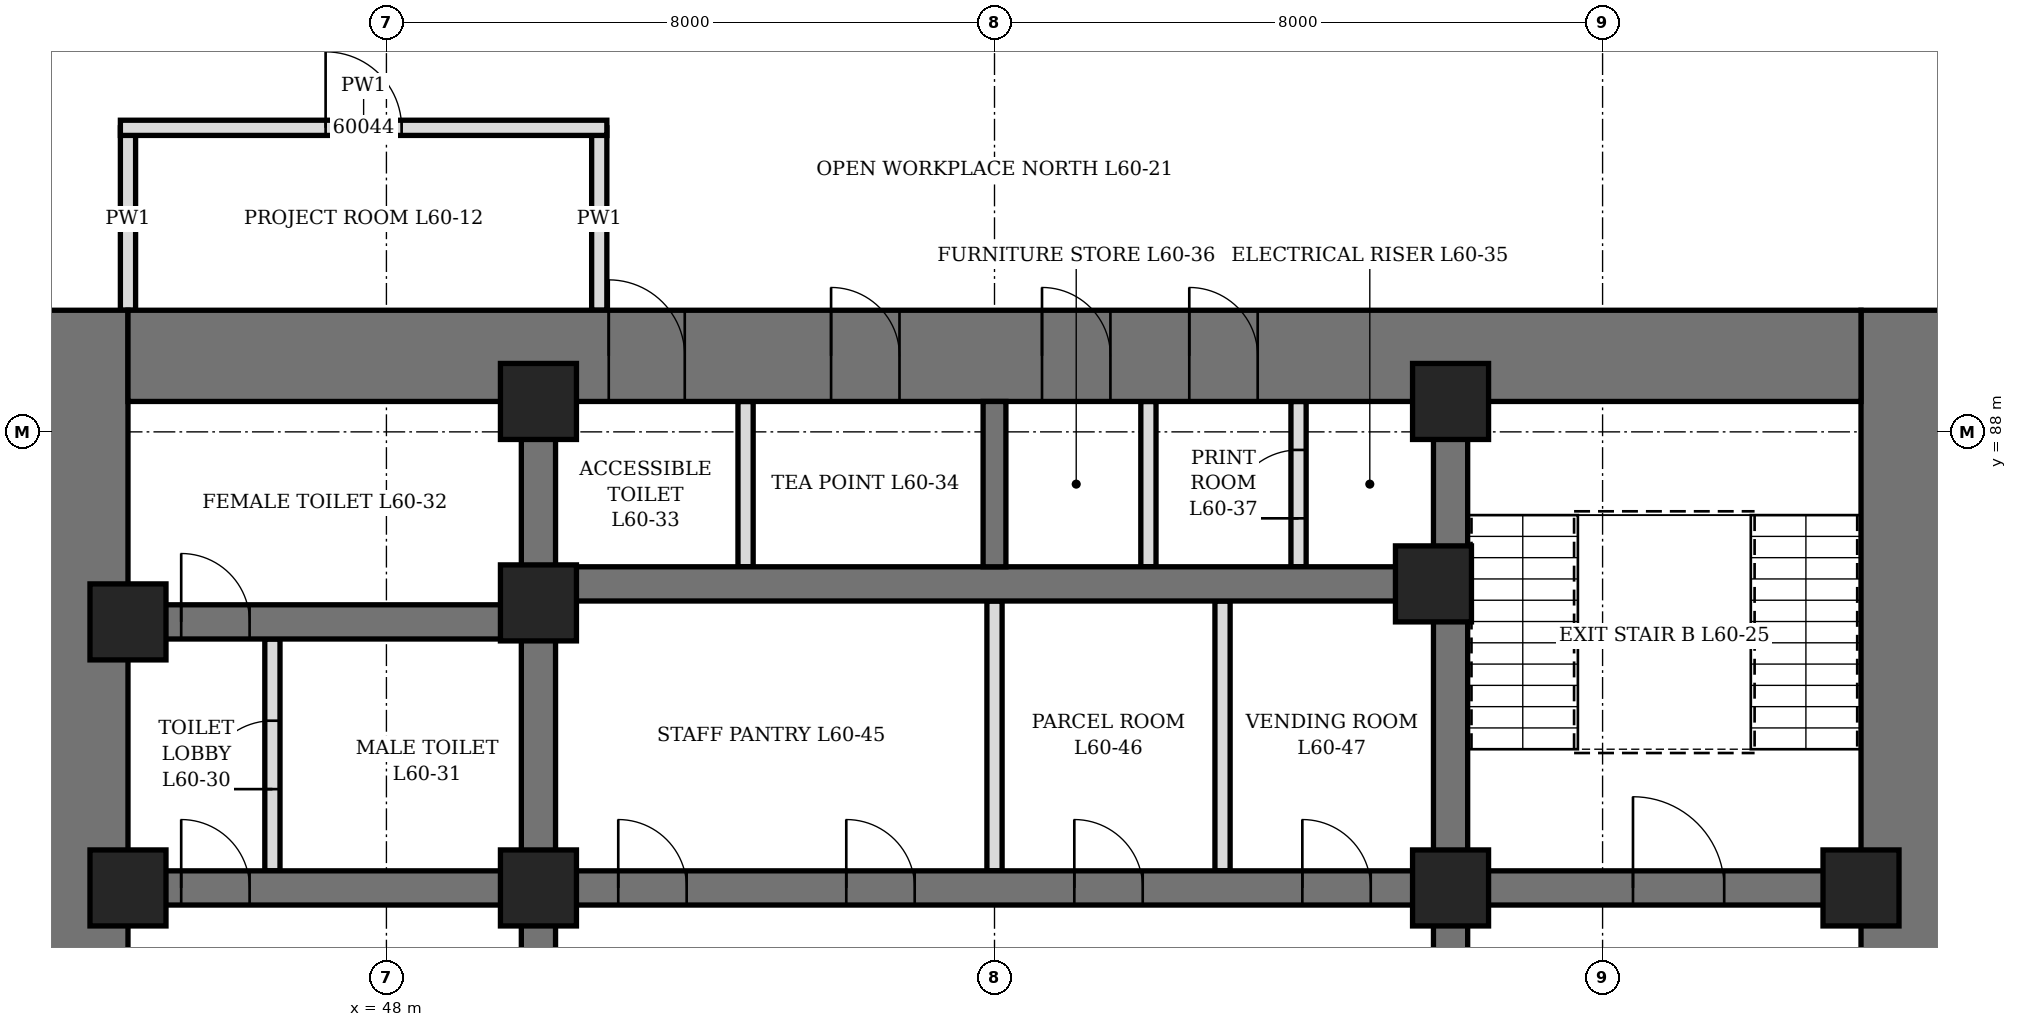
"""IFC4 building model, lengths in metres.
Left out: names, types, materials, properties, quantities, classifications, styles, units other than length and angle.
Written with IfcOpenShell. Run it as: python <this file> out.ifc"""

import sys

from ifc_helpers import new_model, si_unit, direction, frame, frame_2d, origin, origin_2d, place, context, subcontext, project, spatial, rectangle, hollow_rectangle, extrude, element, fill, save


model = new_model("IFC4")
c1 = context("Model", 3, precision=1e-05, world=origin(), true_north=direction((0.0, 1.0)))
c2 = subcontext(c1, "Body", "Model", "MODEL_VIEW")
j1 = project(units=[si_unit("LENGTHUNIT", "METRE"), si_unit("PLANEANGLEUNIT", "RADIAN")], contexts=[c1])
p1 = place(None, origin())
s1 = spatial("IfcSite", under=j1, at=p1, CompositionType="ELEMENT")
p2 = place(p1, origin())
s2 = spatial("IfcBuilding", under=s1, at=p2, CompositionType="ELEMENT")
p3 = place(p2, frame((0.0, 0.0, 267.1)))
s3 = spatial("IfcBuildingStorey", under=s2, at=p3, CompositionType="ELEMENT", Elevation=267.1)
p4 = place(p3, frame((44.0, 70.4, 0.0), z_axis=(0.0, 0.0, 1.0), x_axis=(0.0, 1.0, 0.0)))
e1 = element("IfcWall", 1, at=p4, inside=s3, PredefinedType="SHEAR", context=c2, shape_type="SweptSolid", body=[
    extrude(rectangle(XDim=19.2, YDim=1.2, at=frame_2d((9.6, 0.0))), origin(), (0.0, 0.0, 1.0), 4.2),
])
p5 = place(p4, frame((8.6, 0.0, 0.0)))
e2 = element("IfcOpeningElement", 2, at=p5, cuts=e1, PredefinedType="OPENING", context=c2, shape_type="SweptSolid", body=[
    extrude(rectangle(XDim=2.0, YDim=2.4, at=frame_2d((1.0, 1.2))), frame((0.0, 0.61, 0.0), z_axis=(0.0, -1.0, 0.0), x_axis=(1.0, 0.0, 0.0)), (0.0, 0.0, 1.0), 1.22),
])
p6 = place(p3, frame((68.0, 70.4, 0.0), z_axis=(0.0, 0.0, 1.0), x_axis=(0.0, 1.0, 0.0)))
e3 = element("IfcWall", 3, at=p6, inside=s3, PredefinedType="SHEAR", context=c2, shape_type="SweptSolid", body=[
    extrude(rectangle(XDim=19.2, YDim=1.2, at=frame_2d((9.6, 0.0))), origin(), (0.0, 0.0, 1.0), 4.2),
])
p7 = place(p6, frame((8.6, 0.0, 0.0)))
e4 = element("IfcOpeningElement", 4, at=p7, cuts=e3, PredefinedType="OPENING", context=c2, shape_type="SweptSolid", body=[
    extrude(rectangle(XDim=2.0, YDim=2.4, at=frame_2d((1.0, 1.2))), frame((0.0, 0.61, 0.0), z_axis=(0.0, -1.0, 0.0), x_axis=(1.0, 0.0, 0.0)), (0.0, 0.0, 1.0), 1.22),
])
p8 = place(p3, frame((44.6, 89.0, 0.0), z_axis=(0.0, 0.0, 1.0), x_axis=(1.0, 0.0, 0.0)))
e5 = element("IfcWall", 5, at=p8, inside=s3, PredefinedType="SHEAR", context=c2, shape_type="SweptSolid", body=[
    extrude(rectangle(XDim=22.8, YDim=1.2, at=frame_2d((11.4, 0.0))), origin(), (0.0, 0.0, 1.0), 4.2),
])
p9 = place(p8, frame((6.325, 0.0, 0.0)))
e6 = element("IfcOpeningElement", 6, at=p9, cuts=e5, PredefinedType="OPENING", context=c2, shape_type="SweptSolid", body=[
    extrude(rectangle(XDim=1.0, YDim=2.1, at=frame_2d((0.5, 1.05))), frame((0.0, 0.61, 0.0), z_axis=(0.0, -1.0, 0.0), x_axis=(1.0, 0.0, 0.0)), (0.0, 0.0, 1.0), 1.22),
])
p10 = place(p8, frame((9.25, 0.0, 0.0)))
e7 = element("IfcOpeningElement", 7, at=p10, cuts=e5, PredefinedType="OPENING", context=c2, shape_type="SweptSolid", body=[
    extrude(rectangle(XDim=0.9, YDim=2.1, at=frame_2d((0.45, 1.05))), frame((0.0, 0.61, 0.0), z_axis=(0.0, -1.0, 0.0), x_axis=(1.0, 0.0, 0.0)), (0.0, 0.0, 1.0), 1.22),
])
p11 = place(p8, frame((12.025, 0.0, 0.0)))
e8 = element("IfcOpeningElement", 8, at=p11, cuts=e5, PredefinedType="OPENING", context=c2, shape_type="SweptSolid", body=[
    extrude(rectangle(XDim=0.9, YDim=2.1, at=frame_2d((0.45, 1.05))), frame((0.0, 0.61, 0.0), z_axis=(0.0, -1.0, 0.0), x_axis=(1.0, 0.0, 0.0)), (0.0, 0.0, 1.0), 1.22),
])
p12 = place(p8, frame((13.962, 0.0, 0.0)))
e9 = element("IfcOpeningElement", 9, at=p12, cuts=e5, PredefinedType="OPENING", context=c2, shape_type="SweptSolid", body=[
    extrude(rectangle(XDim=0.9, YDim=2.1, at=frame_2d((0.45, 1.05))), frame((0.0, 0.61, 0.0), z_axis=(0.0, -1.0, 0.0), x_axis=(1.0, 0.0, 0.0)), (0.0, 0.0, 1.0), 1.22),
])
p13 = place(p3, frame((50.0, 71.6, 0.0), z_axis=(0.0, 0.0, 1.0), x_axis=(0.0, 1.0, 0.0)))
e10 = element("IfcWall", 10, at=p13, inside=s3, PredefinedType="SHEAR", context=c2, shape_type="SweptSolid", body=[
    extrude(rectangle(XDim=16.8, YDim=0.45, at=frame_2d((8.4, 0.0))), origin(), (0.0, 0.0, 1.0), 4.2),
])
p14 = place(p13, frame((7.5, 0.0, 0.0)))
e11 = element("IfcOpeningElement", 11, at=p14, cuts=e10, PredefinedType="OPENING", context=c2, shape_type="SweptSolid", body=[
    extrude(rectangle(XDim=1.8, YDim=2.4, at=frame_2d((0.9, 1.2))), frame((0.0, 0.235, 0.0), z_axis=(0.0, -1.0, 0.0), x_axis=(1.0, 0.0, 0.0)), (0.0, 0.0, 1.0), 0.47),
])
p15 = place(p3, frame((62.0, 71.6, 0.0), z_axis=(0.0, 0.0, 1.0), x_axis=(0.0, 1.0, 0.0)))
e12 = element("IfcWall", 12, at=p15, inside=s3, PredefinedType="SHEAR", context=c2, shape_type="SweptSolid", body=[
    extrude(rectangle(XDim=16.8, YDim=0.45, at=frame_2d((8.4, 0.0))), origin(), (0.0, 0.0, 1.0), 4.2),
])
p16 = place(p15, frame((7.5, 0.0, 0.0)))
e13 = element("IfcOpeningElement", 13, at=p16, cuts=e12, PredefinedType="OPENING", context=c2, shape_type="SweptSolid", body=[
    extrude(rectangle(XDim=1.8, YDim=2.4, at=frame_2d((0.9, 1.2))), frame((0.0, 0.235, 0.0), z_axis=(0.0, -1.0, 0.0), x_axis=(1.0, 0.0, 0.0)), (0.0, 0.0, 1.0), 0.47),
])
p17 = place(p3, frame((44.6, 82.0, 0.0), z_axis=(0.0, 0.0, 1.0), x_axis=(1.0, 0.0, 0.0)))
e14 = element("IfcWall", 14, at=p17, inside=s3, PredefinedType="SHEAR", context=c2, shape_type="SweptSolid", body=[
    extrude(rectangle(XDim=5.175, YDim=0.45, at=frame_2d((2.587, 0.0))), origin(), (0.0, 0.0, 1.0), 4.2),
])
p18 = place(p17, frame((0.7, 0.0, 0.0)))
e15 = element("IfcOpeningElement", 15, at=p18, cuts=e14, PredefinedType="OPENING", context=c2, shape_type="SweptSolid", body=[
    extrude(rectangle(XDim=0.9, YDim=2.1, at=frame_2d((0.45, 1.05))), frame((0.0, 0.235, 0.0), z_axis=(0.0, -1.0, 0.0), x_axis=(1.0, 0.0, 0.0)), (0.0, 0.0, 1.0), 0.47),
])
p19 = place(p3, frame((44.6, 85.5, 0.0), z_axis=(0.0, 0.0, 1.0), x_axis=(1.0, 0.0, 0.0)))
e16 = element("IfcWall", 16, at=p19, inside=s3, PredefinedType="SHEAR", context=c2, shape_type="SweptSolid", body=[
    extrude(rectangle(XDim=5.175, YDim=0.45, at=frame_2d((2.587, 0.0))), origin(), (0.0, 0.0, 1.0), 4.2),
])
p20 = place(p19, frame((0.7, 0.0, 0.0)))
e17 = element("IfcOpeningElement", 17, at=p20, cuts=e16, PredefinedType="OPENING", context=c2, shape_type="SweptSolid", body=[
    extrude(rectangle(XDim=0.9, YDim=2.1, at=frame_2d((0.45, 1.05))), frame((0.0, 0.235, 0.0), z_axis=(0.0, -1.0, 0.0), x_axis=(1.0, 0.0, 0.0)), (0.0, 0.0, 1.0), 0.47),
])
p21 = place(p3, frame((62.225, 82.0, 0.0), z_axis=(0.0, 0.0, 1.0), x_axis=(1.0, 0.0, 0.0)))
e18 = element("IfcWall", 18, at=p21, inside=s3, PredefinedType="SHEAR", context=c2, shape_type="SweptSolid", body=[
    extrude(rectangle(XDim=5.175, YDim=0.45, at=frame_2d((2.587, 0.0))), origin(), (0.0, 0.0, 1.0), 4.2),
])
p22 = place(p21, frame((2.175, 0.0, 0.0)))
e19 = element("IfcOpeningElement", 19, at=p22, cuts=e18, PredefinedType="OPENING", context=c2, shape_type="SweptSolid", body=[
    extrude(rectangle(XDim=1.2, YDim=2.1, at=frame_2d((0.6, 1.05))), frame((0.0, 0.235, 0.0), z_axis=(0.0, -1.0, 0.0), x_axis=(1.0, 0.0, 0.0)), (0.0, 0.0, 1.0), 0.47),
])
p23 = place(p3, frame((50.225, 82.0, 0.0), z_axis=(0.0, 0.0, 1.0), x_axis=(1.0, 0.0, 0.0)))
e20 = element("IfcWall", 20, at=p23, inside=s3, PredefinedType="SHEAR", context=c2, shape_type="SweptSolid", body=[
    extrude(rectangle(XDim=11.55, YDim=0.45, at=frame_2d((5.775, 0.0))), origin(), (0.0, 0.0, 1.0), 4.2),
])
p24 = place(p23, frame((0.825, 0.0, 0.0)))
e21 = element("IfcOpeningElement", 21, at=p24, cuts=e20, PredefinedType="OPENING", context=c2, shape_type="SweptSolid", body=[
    extrude(rectangle(XDim=0.9, YDim=2.1, at=frame_2d((0.45, 1.05))), frame((0.0, 0.235, 0.0), z_axis=(0.0, -1.0, 0.0), x_axis=(1.0, 0.0, 0.0)), (0.0, 0.0, 1.0), 0.47),
])
p25 = place(p23, frame((3.825, 0.0, 0.0)))
e22 = element("IfcOpeningElement", 22, at=p25, cuts=e20, PredefinedType="OPENING", context=c2, shape_type="SweptSolid", body=[
    extrude(rectangle(XDim=0.9, YDim=2.1, at=frame_2d((0.45, 1.05))), frame((0.0, 0.235, 0.0), z_axis=(0.0, -1.0, 0.0), x_axis=(1.0, 0.0, 0.0)), (0.0, 0.0, 1.0), 0.47),
])
p26 = place(p23, frame((6.825, 0.0, 0.0)))
e23 = element("IfcOpeningElement", 23, at=p26, cuts=e20, PredefinedType="OPENING", context=c2, shape_type="SweptSolid", body=[
    extrude(rectangle(XDim=0.9, YDim=2.1, at=frame_2d((0.45, 1.05))), frame((0.0, 0.235, 0.0), z_axis=(0.0, -1.0, 0.0), x_axis=(1.0, 0.0, 0.0)), (0.0, 0.0, 1.0), 0.47),
])
p27 = place(p23, frame((9.825, 0.0, 0.0)))
e24 = element("IfcOpeningElement", 24, at=p27, cuts=e20, PredefinedType="OPENING", context=c2, shape_type="SweptSolid", body=[
    extrude(rectangle(XDim=0.9, YDim=2.1, at=frame_2d((0.45, 1.05))), frame((0.0, 0.235, 0.0), z_axis=(0.0, -1.0, 0.0), x_axis=(1.0, 0.0, 0.0)), (0.0, 0.0, 1.0), 0.47),
])
p28 = place(p3, frame((50.225, 86.0, 0.0), z_axis=(0.0, 0.0, 1.0), x_axis=(1.0, 0.0, 0.0)))
e25 = element("IfcWall", 25, at=p28, inside=s3, PredefinedType="SHEAR", context=c2, shape_type="SweptSolid", body=[
    extrude(rectangle(XDim=11.55, YDim=0.45, at=frame_2d((5.775, 0.0))), origin(), (0.0, 0.0, 1.0), 4.2),
])
p29 = place(p3, frame((56.0, 86.225, 0.0), z_axis=(0.0, 0.0, 1.0), x_axis=(0.0, 1.0, 0.0)))
e26 = element("IfcWall", 26, at=p29, inside=s3, PredefinedType="SHEAR", context=c2, shape_type="SweptSolid", body=[
    extrude(rectangle(XDim=2.175, YDim=0.3, at=frame_2d((1.087, 0.0))), origin(), (0.0, 0.0, 1.0), 4.2),
])
for number, where, z_axis, x_axis in (
    (27, (44.6, 82.0, 0.0), (0.0, 0.0, 1.0), (1.0, 0.0, 0.0)),
    (28, (44.6, 85.5, 0.0), (0.0, 0.0, 1.0), (1.0, 0.0, 0.0)),
    (29, (50.0, 82.0, 0.0), (0.0, 0.0, 1.0), (1.0, 0.0, 0.0)),
    (30, (50.0, 85.75, 0.0), (0.0, 0.0, 1.0), (1.0, 0.0, 0.0)),
    (31, (50.0, 88.4, 0.0), (0.0, 0.0, 1.0), (1.0, 0.0, 0.0)),
    (32, (61.775, 86.0, 0.0), (0.0, 0.0, 1.0), (1.0, 0.0, 0.0)),
    (33, (62.0, 82.0, 0.0), (0.0, 0.0, 1.0), (1.0, 0.0, 0.0)),
    (34, (62.0, 88.4, 0.0), (0.0, 0.0, 1.0), (1.0, 0.0, 0.0)),
    (35, (67.4, 82.0, 0.0), (0.0, 0.0, 1.0), (1.0, 0.0, 0.0)),
):
    element("IfcColumn", number, at=place(p3, frame(where, z_axis=z_axis, x_axis=x_axis)), inside=s3, PredefinedType="COLUMN", context=c2, shape_type="SweptSolid", body=[
        extrude(hollow_rectangle(XDim=1.0, YDim=1.0, WallThickness=0.15, at=origin_2d()), origin(), (0.0, 0.0, 1.0), 4.2),
    ])
p30 = place(p3, frame((46.5, 82.225, 0.0), z_axis=(0.0, 0.0, 1.0), x_axis=(0.0, 1.0, 0.0)))
e36 = element("IfcWall", 36, at=p30, inside=s3, PredefinedType="PARTITIONING", context=c2, shape_type="SweptSolid", body=[
    extrude(rectangle(XDim=3.05, YDim=0.2, at=frame_2d((1.525, 0.0))), origin(), (0.0, 0.0, 1.0), 4.04),
])
p31 = place(p30, frame((1.075, 0.0, 0.0)))
e37 = element("IfcOpeningElement", 37, at=p31, cuts=e36, PredefinedType="OPENING", context=c2, shape_type="SweptSolid", body=[
    extrude(rectangle(XDim=0.9, YDim=2.1, at=frame_2d((0.45, 1.05))), frame((0.0, 0.11, 0.0), z_axis=(0.0, -1.0, 0.0), x_axis=(1.0, 0.0, 0.0)), (0.0, 0.0, 1.0), 0.22),
])
p32 = place(p3, frame((52.725, 86.225, 0.0), z_axis=(0.0, 0.0, 1.0), x_axis=(0.0, 1.0, 0.0)))
e38 = element("IfcWall", 38, at=p32, inside=s3, PredefinedType="PARTITIONING", context=c2, shape_type="SweptSolid", body=[
    extrude(rectangle(XDim=2.175, YDim=0.2, at=frame_2d((1.087, 0.0))), origin(), (0.0, 0.0, 1.0), 4.04),
])
p33 = place(p3, frame((60.0, 86.225, 0.0), z_axis=(0.0, 0.0, 1.0), x_axis=(0.0, 1.0, 0.0)))
e39 = element("IfcWall", 39, at=p33, inside=s3, PredefinedType="PARTITIONING", context=c2, shape_type="SweptSolid", body=[
    extrude(rectangle(XDim=2.175, YDim=0.2, at=frame_2d((1.087, 0.0))), origin(), (0.0, 0.0, 1.0), 4.04),
])
p34 = place(p33, frame((0.637, 0.0, 0.0)))
e40 = element("IfcOpeningElement", 40, at=p34, cuts=e39, PredefinedType="OPENING", context=c2, shape_type="SweptSolid", body=[
    extrude(rectangle(XDim=0.9, YDim=2.1, at=frame_2d((0.45, 1.05))), frame((0.0, 0.11, 0.0), z_axis=(0.0, -1.0, 0.0), x_axis=(1.0, 0.0, 0.0)), (0.0, 0.0, 1.0), 0.22),
])
p35 = place(p3, frame((58.025, 86.225, 0.0), z_axis=(0.0, 0.0, 1.0), x_axis=(0.0, 1.0, 0.0)))
e41 = element("IfcWall", 41, at=p35, inside=s3, PredefinedType="PARTITIONING", context=c2, shape_type="SweptSolid", body=[
    extrude(rectangle(XDim=2.175, YDim=0.2, at=frame_2d((1.087, 0.0))), origin(), (0.0, 0.0, 1.0), 4.04),
])
p36 = place(p3, frame((56.0, 82.225, 0.0), z_axis=(0.0, 0.0, 1.0), x_axis=(0.0, 1.0, 0.0)))
e42 = element("IfcWall", 42, at=p36, inside=s3, PredefinedType="PARTITIONING", context=c2, shape_type="SweptSolid", body=[
    extrude(rectangle(XDim=3.55, YDim=0.2, at=frame_2d((1.775, 0.0))), origin(), (0.0, 0.0, 1.0), 3.14),
])
p37 = place(p3, frame((59.0, 82.225, 0.0), z_axis=(0.0, 0.0, 1.0), x_axis=(0.0, 1.0, 0.0)))
e43 = element("IfcWall", 43, at=p37, inside=s3, PredefinedType="PARTITIONING", context=c2, shape_type="SweptSolid", body=[
    extrude(rectangle(XDim=3.55, YDim=0.2, at=frame_2d((1.775, 0.0))), origin(), (0.0, 0.0, 1.0), 4.04),
])
for number, where, z_axis, x_axis in (
    (44, (44.6, 89.6, 0.0), (0.0, 0.0, 1.0), (0.0, 1.0, 0.0)),
    (45, (50.8, 89.6, 0.0), (0.0, 0.0, 1.0), (0.0, 1.0, 0.0)),
):
    element("IfcWall", number, at=place(p3, frame(where, z_axis=z_axis, x_axis=x_axis)), inside=s3, PredefinedType="PARTITIONING", context=c2, shape_type="SweptSolid", body=[
        extrude(rectangle(XDim=2.4, YDim=0.2, at=frame_2d((1.2, 0.0))), origin(), (0.0, 0.0, 1.0), 4.04),
    ])
p38 = place(p3, frame((44.5, 92.0, 0.0), z_axis=(0.0, 0.0, 1.0), x_axis=(1.0, 0.0, 0.0)))
e46 = element("IfcWall", 46, at=p38, inside=s3, PredefinedType="PARTITIONING", context=c2, shape_type="SweptSolid", body=[
    extrude(rectangle(XDim=6.4, YDim=0.2, at=frame_2d((3.2, 0.0))), origin(), (0.0, 0.0, 1.0), 4.04),
])
p39 = place(p38, frame((2.7, 0.0, 0.0)))
e47 = element("IfcOpeningElement", 47, at=p39, cuts=e46, PredefinedType="OPENING", context=c2, shape_type="SweptSolid", body=[
    extrude(rectangle(XDim=1.0, YDim=2.1, at=frame_2d((0.5, 1.05))), frame((0.0, 0.11, 0.0), z_axis=(0.0, -1.0, 0.0), x_axis=(1.0, 0.0, 0.0)), (0.0, 0.0, 1.0), 0.22),
])
p40 = place(p18, origin())
e48 = element("IfcDoor", 48, at=p40, inside=s3, OperationType="SINGLE_SWING_LEFT", PredefinedType="DOOR", context=c2, shape_type="SweptSolid", body=[
    extrude(rectangle(XDim=0.9, YDim=2.1, at=frame_2d((0.45, 1.05))), frame((0.0, 0.225, 0.0), z_axis=(0.0, -1.0, 0.0), x_axis=(1.0, 0.0, 0.0)), (0.0, 0.0, 1.0), 0.449),
])
fill(e15, e48)
p41 = place(p31, origin())
e49 = element("IfcDoor", 49, at=p41, inside=s3, OperationType="SINGLE_SWING_RIGHT", PredefinedType="DOOR", context=c2, shape_type="SweptSolid", body=[
    extrude(rectangle(XDim=0.9, YDim=2.1, at=frame_2d((0.45, 1.05))), frame((0.0, 0.1, 0.0), z_axis=(0.0, -1.0, 0.0), x_axis=(1.0, 0.0, 0.0)), (0.0, 0.0, 1.0), 0.199),
])
fill(e37, e49)
p42 = place(p20, origin())
e50 = element("IfcDoor", 50, at=p42, inside=s3, OperationType="SINGLE_SWING_RIGHT", PredefinedType="DOOR", context=c2, shape_type="SweptSolid", body=[
    extrude(rectangle(XDim=0.9, YDim=2.1, at=frame_2d((0.45, 1.05))), frame((0.0, 0.225, 0.0), z_axis=(0.0, -1.0, 0.0), x_axis=(1.0, 0.0, 0.0)), (0.0, 0.0, 1.0), 0.449),
])
fill(e17, e50)
p43 = place(p9, origin())
e51 = element("IfcDoor", 51, at=p43, inside=s3, OperationType="SINGLE_SWING_LEFT", PredefinedType="DOOR", context=c2, shape_type="SweptSolid", body=[
    extrude(rectangle(XDim=1.0, YDim=2.1, at=frame_2d((0.5, 1.05))), frame((0.0, 0.35, 0.0), z_axis=(0.0, -1.0, 0.0), x_axis=(1.0, 0.0, 0.0)), (0.0, 0.0, 1.0), 0.7),
])
fill(e6, e51)
p44 = place(p10, origin())
e52 = element("IfcDoor", 52, at=p44, inside=s3, OperationType="SINGLE_SWING_LEFT", PredefinedType="DOOR", context=c2, shape_type="SweptSolid", body=[
    extrude(rectangle(XDim=0.9, YDim=2.1, at=frame_2d((0.45, 1.05))), frame((0.0, 0.35, 0.0), z_axis=(0.0, -1.0, 0.0), x_axis=(1.0, 0.0, 0.0)), (0.0, 0.0, 1.0), 0.7),
])
fill(e7, e52)
p45 = place(p11, origin())
e53 = element("IfcDoor", 53, at=p45, inside=s3, OperationType="SINGLE_SWING_LEFT", PredefinedType="DOOR", context=c2, shape_type="SweptSolid", body=[
    extrude(rectangle(XDim=0.9, YDim=2.1, at=frame_2d((0.45, 1.05))), frame((0.0, 0.35, 0.0), z_axis=(0.0, -1.0, 0.0), x_axis=(1.0, 0.0, 0.0)), (0.0, 0.0, 1.0), 0.7),
])
fill(e8, e53)
p46 = place(p12, origin())
e54 = element("IfcDoor", 54, at=p46, inside=s3, OperationType="SINGLE_SWING_LEFT", PredefinedType="DOOR", context=c2, shape_type="SweptSolid", body=[
    extrude(rectangle(XDim=0.9, YDim=2.1, at=frame_2d((0.45, 1.05))), frame((0.0, 0.35, 0.0), z_axis=(0.0, -1.0, 0.0), x_axis=(1.0, 0.0, 0.0)), (0.0, 0.0, 1.0), 0.7),
])
fill(e9, e54)
p47 = place(p34, origin())
e55 = element("IfcDoor", 55, at=p47, inside=s3, OperationType="SINGLE_SWING_LEFT", PredefinedType="DOOR", context=c2, shape_type="SweptSolid", body=[
    extrude(rectangle(XDim=0.9, YDim=2.1, at=frame_2d((0.45, 1.05))), frame((0.0, 0.1, 0.0), z_axis=(0.0, -1.0, 0.0), x_axis=(1.0, 0.0, 0.0)), (0.0, 0.0, 1.0), 0.199),
])
fill(e40, e55)
p48 = place(p24, origin())
e56 = element("IfcDoor", 56, at=p48, inside=s3, OperationType="SINGLE_SWING_LEFT", PredefinedType="DOOR", context=c2, shape_type="SweptSolid", body=[
    extrude(rectangle(XDim=0.9, YDim=2.1, at=frame_2d((0.45, 1.05))), frame((0.0, 0.225, 0.0), z_axis=(0.0, -1.0, 0.0), x_axis=(1.0, 0.0, 0.0)), (0.0, 0.0, 1.0), 0.449),
])
fill(e21, e56)
p49 = place(p25, origin())
e57 = element("IfcDoor", 57, at=p49, inside=s3, OperationType="SINGLE_SWING_LEFT", PredefinedType="DOOR", context=c2, shape_type="SweptSolid", body=[
    extrude(rectangle(XDim=0.9, YDim=2.1, at=frame_2d((0.45, 1.05))), frame((0.0, 0.225, 0.0), z_axis=(0.0, -1.0, 0.0), x_axis=(1.0, 0.0, 0.0)), (0.0, 0.0, 1.0), 0.449),
])
fill(e22, e57)
p50 = place(p26, origin())
e58 = element("IfcDoor", 58, at=p50, inside=s3, OperationType="SINGLE_SWING_LEFT", PredefinedType="DOOR", context=c2, shape_type="SweptSolid", body=[
    extrude(rectangle(XDim=0.9, YDim=2.1, at=frame_2d((0.45, 1.05))), frame((0.0, 0.225, 0.0), z_axis=(0.0, -1.0, 0.0), x_axis=(1.0, 0.0, 0.0)), (0.0, 0.0, 1.0), 0.449),
])
fill(e23, e58)
p51 = place(p27, origin())
e59 = element("IfcDoor", 59, at=p51, inside=s3, OperationType="SINGLE_SWING_LEFT", PredefinedType="DOOR", context=c2, shape_type="SweptSolid", body=[
    extrude(rectangle(XDim=0.9, YDim=2.1, at=frame_2d((0.45, 1.05))), frame((0.0, 0.225, 0.0), z_axis=(0.0, -1.0, 0.0), x_axis=(1.0, 0.0, 0.0)), (0.0, 0.0, 1.0), 0.449),
])
fill(e24, e59)
p52 = place(p22, origin())
e60 = element("IfcDoor", 60, at=p52, inside=s3, OperationType="SINGLE_SWING_LEFT", PredefinedType="DOOR", context=c2, shape_type="SweptSolid", body=[
    extrude(rectangle(XDim=1.2, YDim=2.1, at=frame_2d((0.6, 1.05))), frame((0.0, 0.225, 0.0), z_axis=(0.0, -1.0, 0.0), x_axis=(1.0, 0.0, 0.0)), (0.0, 0.0, 1.0), 0.449),
])
fill(e19, e60)
p53 = place(p39, origin())
e61 = element("IfcDoor", 61, at=p53, inside=s3, OperationType="SINGLE_SWING_LEFT", PredefinedType="DOOR", context=c2, shape_type="SweptSolid", body=[
    extrude(rectangle(XDim=1.0, YDim=2.1, at=frame_2d((0.5, 1.05))), frame((0.0, 0.1, 0.0), z_axis=(0.0, -1.0, 0.0), x_axis=(1.0, 0.0, 0.0)), (0.0, 0.0, 1.0), 0.199),
])
fill(e47, e61)
save(model, sys.argv[1])
